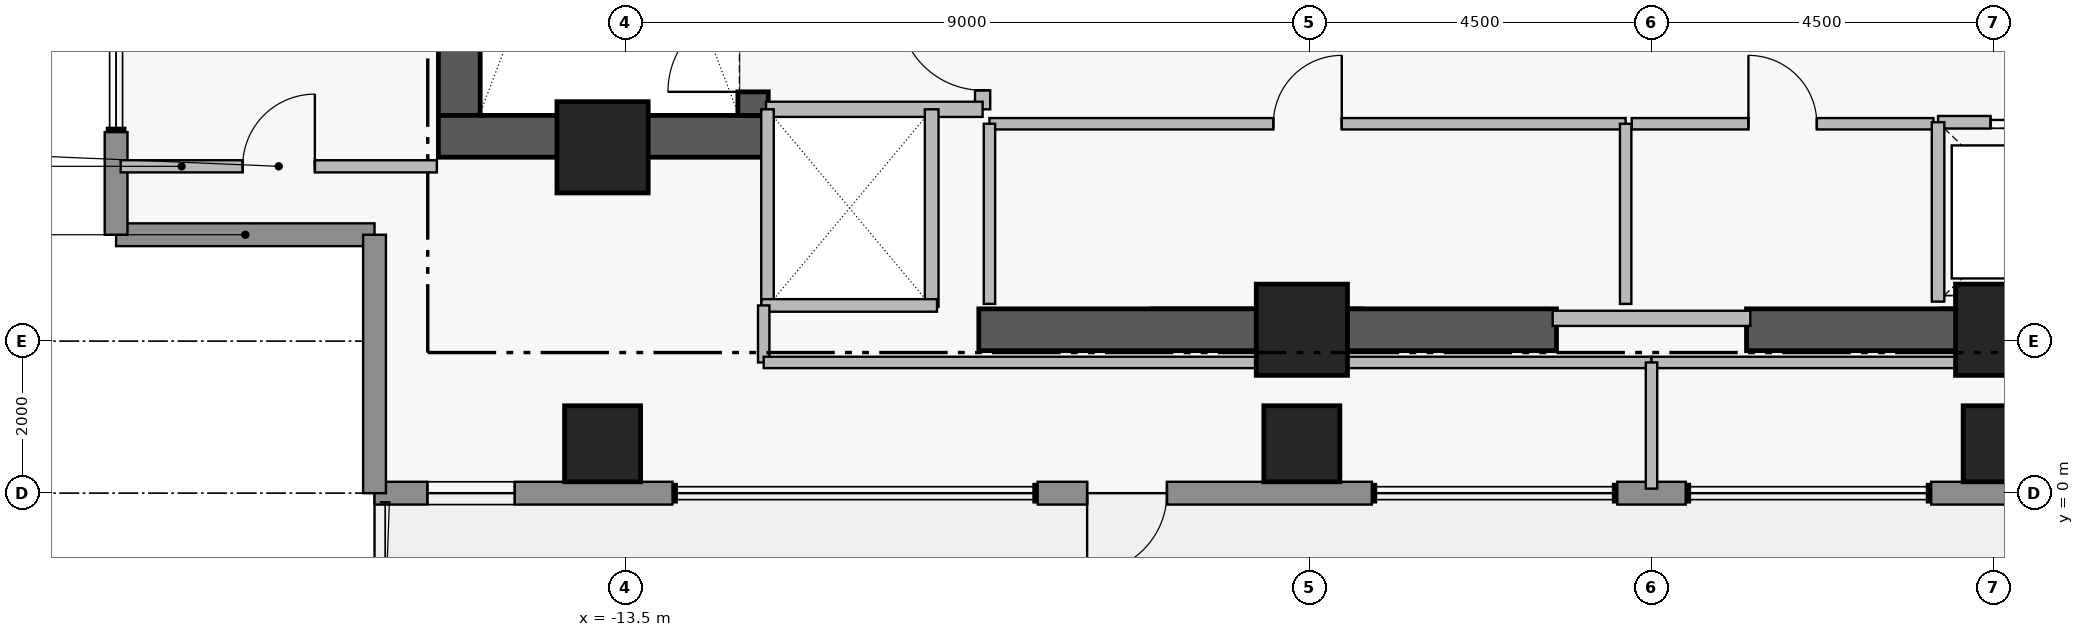
"""IFC4 building model, lengths in metres.
Left out: names, types, materials, properties, quantities, classifications, styles, units other than length and angle.
Written with IfcOpenShell. Run it as: python <this file> out.ifc"""

import sys

from ifc_helpers import new_model, si_unit, direction, frame, frame_2d, origin, origin_2d, place, context, subcontext, project, spatial, rectangle, extrude, element, fill, save


model = new_model("IFC4")
c1 = context("Model", 3, precision=1e-05, world=origin(), true_north=direction((0.0, 1.0)))
c2 = subcontext(c1, "Body", "Model", "MODEL_VIEW")
j1 = project(units=[si_unit("LENGTHUNIT", "METRE"), si_unit("PLANEANGLEUNIT", "RADIAN")], contexts=[c1])
p1 = place(None, origin())
s1 = spatial("IfcSite", under=j1, at=p1, CompositionType="ELEMENT")
p2 = place(p1, origin())
s2 = spatial("IfcBuilding", under=s1, at=p2, CompositionType="ELEMENT")
p3 = place(p2, frame((0.0, 0.0, 288.45)))
s3 = spatial("IfcBuildingStorey", under=s2, at=p3, CompositionType="ELEMENT", Elevation=288.45)
p4 = place(p3, frame((-15.685, 4.97, 0.0), z_axis=(0.0, 0.0, 1.0), x_axis=(0.0, 1.0, 0.0)))
e1 = element("IfcWall", 1, at=p4, inside=s3, PredefinedType="SHEAR", context=c2, shape_type="SweptSolid", body=[
    extrude(rectangle(XDim=8.96, YDim=0.55, at=frame_2d((4.48, 0.0))), origin(), (0.0, 0.0, 1.0), 4.21),
])
p5 = place(p3, frame((-15.96, 4.695, 0.0), z_axis=(0.0, 0.0, 1.0), x_axis=(1.0, 0.0, 0.0)))
e2 = element("IfcWall", 2, at=p5, inside=s3, PredefinedType="SHEAR", context=c2, shape_type="SweptSolid", body=[
    extrude(rectangle(XDim=4.36, YDim=0.55, at=frame_2d((2.18, 0.0))), origin(), (0.0, 0.0, 1.0), 4.21),
])
for number, where, z_axis, x_axis in (
    (3, (-8.85, 2.15, 0.0), (0.0, 0.0, 1.0), (1.0, 0.0, 0.0)),
    (4, (1.25, 2.15, 0.0), (0.0, 0.0, 1.0), (1.0, 0.0, 0.0)),
):
    element("IfcWall", number, at=place(p3, frame(where, z_axis=z_axis, x_axis=x_axis)), inside=s3, PredefinedType="SHEAR", context=c2, shape_type="SweptSolid", body=[
        extrude(rectangle(XDim=7.6, YDim=0.55, at=frame_2d((3.8, 0.0))), origin(), (0.0, 0.0, 1.0), 4.18),
    ])
p6 = place(p3, frame((-11.82, 4.97, 0.0), z_axis=(0.0, 0.0, 1.0), x_axis=(0.0, 1.0, 0.0)))
e5 = element("IfcWall", 5, at=p6, inside=s3, PredefinedType="SHEAR", context=c2, shape_type="SweptSolid", body=[
    extrude(rectangle(XDim=8.96, YDim=0.4, at=frame_2d((4.48, 0.0))), origin(), (0.0, 0.0, 1.0), 4.21),
])
p7 = place(p6, frame((0.31, 0.0, 0.0)))
e6 = element("IfcOpeningElement", 6, at=p7, cuts=e5, PredefinedType="OPENING", context=c2, shape_type="SweptSolid", body=[
    extrude(rectangle(XDim=1.12, YDim=2.22, at=frame_2d((0.56, 1.11))), frame((0.0, 0.21, 0.0), z_axis=(0.0, -1.0, 0.0), x_axis=(1.0, 0.0, 0.0)), (0.0, 0.0, 1.0), 0.42),
])
for number, where, z_axis, x_axis in (
    (7, (-13.8, 4.55, 0.0), (0.0, 0.0, 1.0), (1.0, 0.0, 0.0)),
    (8, (-4.6, 2.15, 0.0), (0.0, 0.0, 1.0), (1.0, 0.0, 0.0)),
    (9, (4.6, 2.15, 0.0), (0.0, 0.0, 1.0), (1.0, 0.0, 0.0)),
):
    element("IfcColumn", number, at=place(p3, frame(where, z_axis=z_axis, x_axis=x_axis)), inside=s3, PredefinedType="COLUMN", context=c2, shape_type="SweptSolid", body=[
        extrude(rectangle(XDim=1.2, YDim=1.2, at=origin_2d()), origin(), (0.0, 0.0, 1.0), 4.4),
    ])
for number, where, z_axis, x_axis in (
    (10, (-13.8, 0.65, 0.0), (0.0, 0.0, 1.0), (1.0, 0.0, 0.0)),
    (11, (-4.6, 0.65, 0.0), (0.0, 0.0, 1.0), (1.0, 0.0, 0.0)),
    (12, (4.6, 0.65, 0.0), (0.0, 0.0, 1.0), (1.0, 0.0, 0.0)),
):
    element("IfcColumn", number, at=place(p3, frame(where, z_axis=z_axis, x_axis=x_axis)), inside=s3, PredefinedType="COLUMN", context=c2, shape_type="SweptSolid", body=[
        extrude(rectangle(XDim=1.0, YDim=1.0, at=origin_2d()), origin(), (0.0, 0.0, 1.0), 4.4),
    ])
p8 = place(p3, frame((-16.8, 3.4, 0.0), z_axis=(0.0, 0.0, 1.0), x_axis=(-1.0, 0.0, 0.0)))
e13 = element("IfcWall", 13, at=p8, inside=s3, PredefinedType="STANDARD", context=c2, shape_type="SweptSolid", body=[
    extrude(rectangle(XDim=3.4, YDim=0.3, at=frame_2d((1.7, 0.0))), origin(), (0.0, 0.0, 1.0), 4.18),
])
p9 = place(p3, frame((-20.2, 3.4, 0.0), z_axis=(0.0, 0.0, 1.0), x_axis=(0.0, 1.0, 0.0)))
e14 = element("IfcWall", 14, at=p9, inside=s3, PredefinedType="STANDARD", context=c2, shape_type="SweptSolid", body=[
    extrude(rectangle(XDim=1.35, YDim=0.3, at=frame_2d((0.675, 0.0))), origin(), (0.0, 0.0, 1.0), 4.18),
])
p10 = place(p3, frame((5.52, 0.0, 0.0), z_axis=(0.0, 0.0, 1.0), x_axis=(-1.0, 0.0, 0.0)))
e15 = element("IfcWall", 15, at=p10, inside=s3, PredefinedType="STANDARD", context=c2, shape_type="SweptSolid", body=[
    extrude(rectangle(XDim=1.84, YDim=0.3, at=frame_2d((0.92, 0.0))), origin(), (0.0, 0.0, 1.0), 4.18),
])
p11 = place(p3, frame((0.45, 0.0, 0.0), z_axis=(0.0, 0.0, 1.0), x_axis=(-1.0, 0.0, 0.0)))
e16 = element("IfcWall", 16, at=p11, inside=s3, PredefinedType="STANDARD", context=c2, shape_type="SweptSolid", body=[
    extrude(rectangle(XDim=0.9, YDim=0.3, at=frame_2d((0.45, 0.0))), origin(), (0.0, 0.0, 1.0), 4.18),
])
p12 = place(p3, frame((-3.68, 0.0, 0.0), z_axis=(0.0, 0.0, 1.0), x_axis=(-1.0, 0.0, 0.0)))
e17 = element("IfcWall", 17, at=p12, inside=s3, PredefinedType="STANDARD", context=c2, shape_type="SweptSolid", body=[
    extrude(rectangle(XDim=4.395, YDim=0.3, at=frame_2d((2.198, 0.0))), origin(), (0.0, 0.0, 1.0), 4.18),
])
p13 = place(p12, frame((2.695, 0.0, 0.0)))
e18 = element("IfcOpeningElement", 18, at=p13, cuts=e17, PredefinedType="OPENING", context=c2, shape_type="SweptSolid", body=[
    extrude(rectangle(XDim=1.05, YDim=2.2, at=frame_2d((0.525, 1.1))), frame((0.0, 0.16, 0.0), z_axis=(0.0, -1.0, 0.0), x_axis=(1.0, 0.0, 0.0)), (0.0, 0.0, 1.0), 0.32),
])
p14 = place(p3, frame((-12.88, 0.0, 0.0), z_axis=(0.0, 0.0, 1.0), x_axis=(-1.0, 0.0, 0.0)))
e19 = element("IfcWall", 19, at=p14, inside=s3, PredefinedType="STANDARD", context=c2, shape_type="SweptSolid", body=[
    extrude(rectangle(XDim=3.92, YDim=0.3, at=frame_2d((1.96, 0.0))), origin(), (0.0, 0.0, 1.0), 4.18),
])
p15 = place(p14, frame((2.075, 0.0, 0.95)))
e20 = element("IfcOpeningElement", 20, at=p15, cuts=e19, PredefinedType="OPENING", context=c2, shape_type="SweptSolid", body=[
    extrude(rectangle(XDim=1.15, YDim=1.55, at=frame_2d((0.575, 0.775))), frame((0.0, 0.16, 0.0), z_axis=(0.0, -1.0, 0.0), x_axis=(1.0, 0.0, 0.0)), (0.0, 0.0, 1.0), 0.32),
])
p16 = place(p3, frame((-16.8, 0.0, 0.0), z_axis=(0.0, 0.0, 1.0), x_axis=(0.0, 1.0, 0.0)))
e21 = element("IfcWall", 21, at=p16, inside=s3, PredefinedType="STANDARD", context=c2, shape_type="SweptSolid", body=[
    extrude(rectangle(XDim=3.4, YDim=0.3, at=frame_2d((1.7, 0.0))), origin(), (0.0, 0.0, 1.0), 4.18),
])
p17 = place(p3, frame((-8.8, 5.05, 0.0), z_axis=(0.0, 0.0, 1.0), x_axis=(0.0, 1.0, 0.0)))
e22 = element("IfcWall", 22, at=p17, inside=s3, PredefinedType="PARTITIONING", context=c2, shape_type="SweptSolid", body=[
    extrude(rectangle(XDim=6.1, YDim=0.2, at=frame_2d((3.05, 0.0))), origin(), (0.0, 0.0, 1.0), 4.18),
])
p18 = place(p17, frame((0.25, 0.0, 0.0)))
e23 = element("IfcOpeningElement", 23, at=p18, cuts=e22, PredefinedType="OPENING", context=c2, shape_type="SweptSolid", body=[
    extrude(rectangle(XDim=1.1, YDim=2.2, at=frame_2d((0.55, 1.1))), frame((0.0, 0.11, 0.0), z_axis=(0.0, -1.0, 0.0), x_axis=(1.0, 0.0, 0.0)), (0.0, 0.0, 1.0), 0.22),
])
p19 = place(p17, frame((3.85, 0.0, 0.0)))
e24 = element("IfcOpeningElement", 24, at=p19, cuts=e22, PredefinedType="OPENING", context=c2, shape_type="SweptSolid", body=[
    extrude(rectangle(XDim=1.1, YDim=2.2, at=frame_2d((0.55, 1.1))), frame((0.0, 0.11, 0.0), z_axis=(0.0, -1.0, 0.0), x_axis=(1.0, 0.0, 0.0)), (0.0, 0.0, 1.0), 0.22),
])
p20 = place(p3, frame((3.77, 4.88, 0.0), z_axis=(0.0, 0.0, 1.0), x_axis=(1.0, 0.0, 0.0)))
e25 = element("IfcWall", 25, at=p20, inside=s3, PredefinedType="PARTITIONING", context=c2, shape_type="SweptSolid", body=[
    extrude(rectangle(XDim=2.48, YDim=0.165, at=frame_2d((1.24, 0.0))), origin(), (0.0, 0.0, 1.0), 4.18),
])
p21 = place(p20, frame((0.69, 0.0, 0.0)))
e26 = element("IfcOpeningElement", 26, at=p21, cuts=e25, PredefinedType="OPENING", context=c2, shape_type="SweptSolid", body=[
    extrude(rectangle(XDim=1.1, YDim=2.25, at=frame_2d((0.55, 1.125))), frame((0.0, 0.093, 0.0), z_axis=(0.0, -1.0, 0.0), x_axis=(1.0, 0.0, 0.0)), (0.0, 0.0, 1.0), 0.185),
])
p22 = place(p3, frame((-8.71, 4.86, 0.0), z_axis=(0.0, 0.0, 1.0), x_axis=(1.0, 0.0, 0.0)))
e27 = element("IfcWall", 27, at=p22, inside=s3, PredefinedType="PARTITIONING", context=c2, shape_type="SweptSolid", body=[
    extrude(rectangle(XDim=8.37, YDim=0.15, at=frame_2d((4.185, 0.0))), origin(), (0.0, 0.0, 1.0), 4.18),
])
p23 = place(p22, frame((3.735, 0.0, 0.0)))
e28 = element("IfcOpeningElement", 28, at=p23, cuts=e27, PredefinedType="OPENING", context=c2, shape_type="SweptSolid", body=[
    extrude(rectangle(XDim=0.9, YDim=2.15, at=frame_2d((0.45, 1.075))), frame((0.0, 0.085, 0.0), z_axis=(0.0, -1.0, 0.0), x_axis=(1.0, 0.0, 0.0)), (0.0, 0.0, 1.0), 0.17),
])
p24 = place(p3, frame((-0.26, 4.86, 0.0), z_axis=(0.0, 0.0, 1.0), x_axis=(1.0, 0.0, 0.0)))
e29 = element("IfcWall", 29, at=p24, inside=s3, PredefinedType="PARTITIONING", context=c2, shape_type="SweptSolid", body=[
    extrude(rectangle(XDim=3.97, YDim=0.15, at=frame_2d((1.985, 0.0))), origin(), (0.0, 0.0, 1.0), 4.18),
])
p25 = place(p24, frame((1.535, 0.0, 0.0)))
e30 = element("IfcOpeningElement", 30, at=p25, cuts=e29, PredefinedType="OPENING", context=c2, shape_type="SweptSolid", body=[
    extrude(rectangle(XDim=0.9, YDim=2.15, at=frame_2d((0.45, 1.075))), frame((0.0, 0.085, 0.0), z_axis=(0.0, -1.0, 0.0), x_axis=(1.0, 0.0, 0.0)), (0.0, 0.0, 1.0), 0.17),
])
p26 = place(p3, frame((-20.14, 4.3, 0.0), z_axis=(0.0, 0.0, 1.0), x_axis=(1.0, 0.0, 0.0)))
e31 = element("IfcWall", 31, at=p26, inside=s3, PredefinedType="PARTITIONING", context=c2, shape_type="SweptSolid", body=[
    extrude(rectangle(XDim=4.16, YDim=0.16, at=frame_2d((2.08, 0.0))), origin(), (0.0, 0.0, 1.0), 4.18),
])
p27 = place(p26, frame((1.605, 0.0, 0.0)))
e32 = element("IfcOpeningElement", 32, at=p27, cuts=e31, PredefinedType="OPENING", context=c2, shape_type="SweptSolid", body=[
    extrude(rectangle(XDim=0.95, YDim=2.15, at=frame_2d((0.475, 1.075))), frame((0.0, 0.09, 0.0), z_axis=(0.0, -1.0, 0.0), x_axis=(1.0, 0.0, 0.0)), (0.0, 0.0, 1.0), 0.18),
])
p28 = place(p3, frame((-11.65, 5.05, 0.0), z_axis=(0.0, 0.0, 1.0), x_axis=(1.0, 0.0, 0.0)))
e33 = element("IfcWall", 33, at=p28, inside=s3, PredefinedType="PARTITIONING", context=c2, shape_type="SweptSolid", body=[
    extrude(rectangle(XDim=2.85, YDim=0.2, at=frame_2d((1.425, 0.0))), origin(), (0.0, 0.0, 1.0), 4.18),
])
p29 = place(p3, frame((3.77, 2.52, 0.0), z_axis=(0.0, 0.0, 1.0), x_axis=(0.0, 1.0, 0.0)))
e34 = element("IfcWall", 34, at=p29, inside=s3, PredefinedType="PARTITIONING", context=c2, shape_type="SweptSolid", body=[
    extrude(rectangle(XDim=2.36, YDim=0.165, at=frame_2d((1.18, 0.0))), origin(), (0.0, 0.0, 1.0), 4.18),
])
p30 = place(p3, frame((-1.3, 2.3, 0.0), z_axis=(0.0, 0.0, 1.0), x_axis=(1.0, 0.0, 0.0)))
e35 = element("IfcWall", 35, at=p30, inside=s3, PredefinedType="PARTITIONING", context=c2, shape_type="SweptSolid", body=[
    extrude(rectangle(XDim=2.6, YDim=0.2, at=frame_2d((1.3, 0.0))), origin(), (0.0, 0.0, 1.0), 3.08),
])
for number, where, z_axis, x_axis in (
    (36, (-8.71, 2.49, 0.0), (0.0, 0.0, 1.0), (0.0, 1.0, 0.0)),
    (37, (-0.34, 2.49, 0.0), (0.0, 0.0, 1.0), (0.0, 1.0, 0.0)),
):
    element("IfcWall", number, at=place(p3, frame(where, z_axis=z_axis, x_axis=x_axis)), inside=s3, PredefinedType="PARTITIONING", context=c2, shape_type="SweptSolid", body=[
        extrude(rectangle(XDim=2.37, YDim=0.15, at=frame_2d((1.185, 0.0))), origin(), (0.0, 0.0, 1.0), 4.18),
    ])
p31 = place(p3, frame((-9.47, 2.45, 0.0), z_axis=(0.0, 0.0, 1.0), x_axis=(0.0, 1.0, 0.0)))
e38 = element("IfcWall", 38, at=p31, inside=s3, PredefinedType="PARTITIONING", context=c2, shape_type="SweptSolid", body=[
    extrude(rectangle(XDim=2.6, YDim=0.18, at=frame_2d((1.3, 0.0))), origin(), (0.0, 0.0, 1.0), 4.18),
])
p32 = place(p3, frame((-11.63, 2.47, 0.0), z_axis=(0.0, 0.0, 1.0), x_axis=(0.0, 1.0, 0.0)))
e39 = element("IfcWall", 39, at=p32, inside=s3, PredefinedType="PARTITIONING", context=c2, shape_type="SweptSolid", body=[
    extrude(rectangle(XDim=2.58, YDim=0.165, at=frame_2d((1.29, 0.0))), origin(), (0.0, 0.0, 1.0), 4.18),
])
p33 = place(p3, frame((-11.71, 2.47, 0.0), z_axis=(0.0, 0.0, 1.0), x_axis=(1.0, 0.0, 0.0)))
e40 = element("IfcWall", 40, at=p33, inside=s3, PredefinedType="PARTITIONING", context=c2, shape_type="SweptSolid", body=[
    extrude(rectangle(XDim=2.31, YDim=0.165, at=frame_2d((1.155, 0.0))), origin(), (0.0, 0.0, 1.0), 3.08),
])
p34 = place(p3, frame((-11.68, 1.72, 0.0), z_axis=(0.0, 0.0, 1.0), x_axis=(0.0, 1.0, 0.0)))
e41 = element("IfcWall", 41, at=p34, inside=s3, PredefinedType="PARTITIONING", context=c2, shape_type="SweptSolid", body=[
    extrude(rectangle(XDim=0.75, YDim=0.15, at=frame_2d((0.375, 0.0))), origin(), (0.0, 0.0, 1.0), 4.18),
])
for number, where, z_axis, x_axis in (
    (42, (-11.68, 1.72, 0.0), (0.0, 0.0, 1.0), (1.0, 0.0, 0.0)),
    (43, (0.0, 1.72, 0.0), (0.0, 0.0, 1.0), (1.0, 0.0, 0.0)),
):
    element("IfcWall", number, at=place(p3, frame(where, z_axis=z_axis, x_axis=x_axis)), inside=s3, PredefinedType="PARTITIONING", context=c2, shape_type="SweptSolid", body=[
        extrude(rectangle(XDim=11.68, YDim=0.15, at=frame_2d((5.84, 0.0))), origin(), (0.0, 0.0, 1.0), 3.08),
    ])
p35 = place(p3, frame((0.0, 0.06, 0.0), z_axis=(0.0, 0.0, 1.0), x_axis=(0.0, 1.0, 0.0)))
e44 = element("IfcWall", 44, at=p35, inside=s3, PredefinedType="PARTITIONING", context=c2, shape_type="SweptSolid", body=[
    extrude(rectangle(XDim=1.66, YDim=0.15, at=frame_2d((0.83, 0.0))), origin(), (0.0, 0.0, 1.0), 4.18),
])
p36 = place(p13, origin())
e45 = element("IfcDoor", 45, at=p36, inside=s3, OperationType="SINGLE_SWING_RIGHT", PredefinedType="DOOR", context=c2, shape_type="SweptSolid", body=[
    extrude(rectangle(XDim=1.05, YDim=2.2, at=frame_2d((0.525, 1.1))), frame((0.0, 0.025, 0.0), z_axis=(0.0, -1.0, 0.0), x_axis=(1.0, 0.0, 0.0)), (0.0, 0.0, 1.0), 0.05),
])
fill(e18, e45)
p37 = place(p15, origin())
e46 = element("IfcWindow", 46, at=p37, inside=s3, PartitioningType="SINGLE_PANEL", PredefinedType="WINDOW", context=c2, shape_type="SweptSolid", body=[
    extrude(rectangle(XDim=1.15, YDim=1.55, at=frame_2d((0.575, 0.775))), frame((0.0, 0.03, 0.0), z_axis=(0.0, -1.0, 0.0), x_axis=(1.0, 0.0, 0.0)), (0.0, 0.0, 1.0), 0.06),
])
fill(e20, e46)
p38 = place(p7, origin())
e47 = element("IfcDoor", 47, at=p38, inside=s3, OperationType="SINGLE_SWING_LEFT", PredefinedType="DOOR", context=c2, shape_type="SweptSolid", body=[
    extrude(rectangle(XDim=1.12, YDim=2.22, at=frame_2d((0.56, 1.11))), frame((0.0, 0.025, 0.0), z_axis=(0.0, -1.0, 0.0), x_axis=(1.0, 0.0, 0.0)), (0.0, 0.0, 1.0), 0.05),
])
fill(e6, e47)
p39 = place(p18, origin())
e48 = element("IfcDoor", 48, at=p39, inside=s3, OperationType="SINGLE_SWING_RIGHT", PredefinedType="DOOR", context=c2, shape_type="SweptSolid", body=[
    extrude(rectangle(XDim=1.1, YDim=2.2, at=frame_2d((0.55, 1.1))), frame((0.0, 0.025, 0.0), z_axis=(0.0, -1.0, 0.0), x_axis=(1.0, 0.0, 0.0)), (0.0, 0.0, 1.0), 0.05),
])
fill(e23, e48)
p40 = place(p21, origin())
e49 = element("IfcDoor", 49, at=p40, inside=s3, OperationType="SLIDING_TO_LEFT", PredefinedType="DOOR", context=c2, shape_type="SweptSolid", body=[
    extrude(rectangle(XDim=1.1, YDim=2.25, at=frame_2d((0.55, 1.125))), frame((0.0, 0.025, 0.0), z_axis=(0.0, -1.0, 0.0), x_axis=(1.0, 0.0, 0.0)), (0.0, 0.0, 1.0), 0.05),
])
fill(e26, e49)
p41 = place(p23, origin())
e50 = element("IfcDoor", 50, at=p41, inside=s3, OperationType="SINGLE_SWING_RIGHT", PredefinedType="DOOR", context=c2, shape_type="SweptSolid", body=[
    extrude(rectangle(XDim=0.9, YDim=2.15, at=frame_2d((0.45, 1.075))), frame((0.0, 0.025, 0.0), z_axis=(0.0, -1.0, 0.0), x_axis=(1.0, 0.0, 0.0)), (0.0, 0.0, 1.0), 0.05),
])
fill(e28, e50)
p42 = place(p25, origin())
e51 = element("IfcDoor", 51, at=p42, inside=s3, OperationType="SINGLE_SWING_LEFT", PredefinedType="DOOR", context=c2, shape_type="SweptSolid", body=[
    extrude(rectangle(XDim=0.9, YDim=2.15, at=frame_2d((0.45, 1.075))), frame((0.0, 0.025, 0.0), z_axis=(0.0, -1.0, 0.0), x_axis=(1.0, 0.0, 0.0)), (0.0, 0.0, 1.0), 0.05),
])
fill(e30, e51)
p43 = place(p27, origin())
e52 = element("IfcDoor", 52, at=p43, inside=s3, OperationType="SINGLE_SWING_RIGHT", PredefinedType="DOOR", context=c2, shape_type="SweptSolid", body=[
    extrude(rectangle(XDim=0.95, YDim=2.15, at=frame_2d((0.475, 1.075))), frame((0.0, 0.025, 0.0), z_axis=(0.0, -1.0, 0.0), x_axis=(1.0, 0.0, 0.0)), (0.0, 0.0, 1.0), 0.05),
])
fill(e32, e52)
save(model, sys.argv[1])
